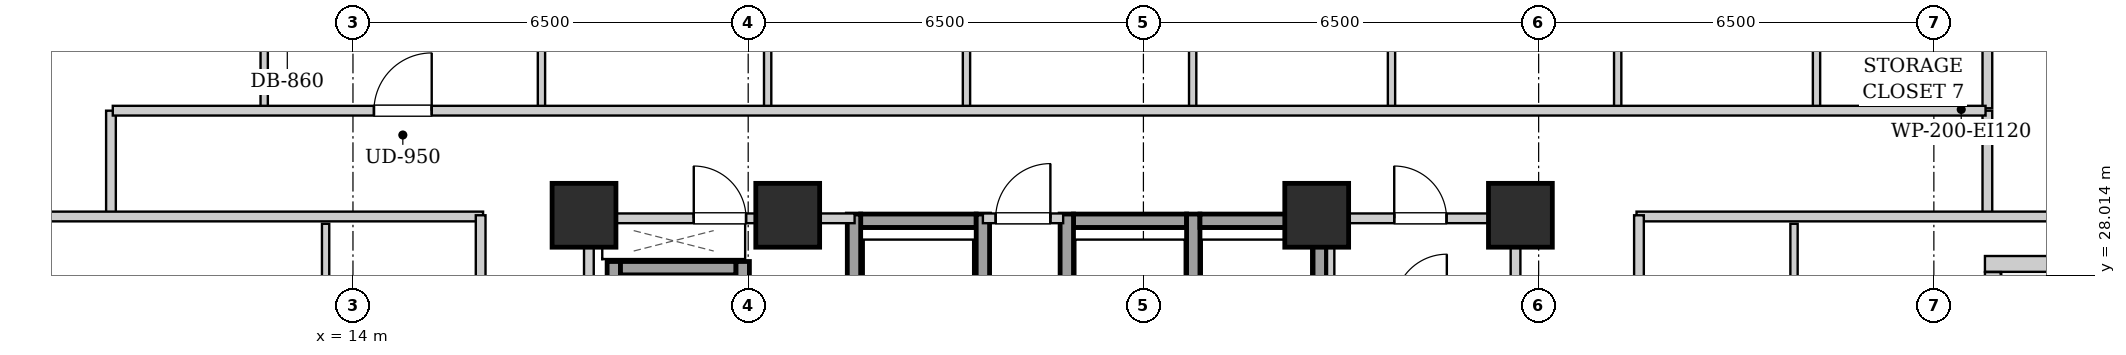
"""IFC4 building model, lengths in metres.
Left out: names, types, materials, properties, quantities, classifications, styles, units other than length and angle.
Written with IfcOpenShell. Run it as: python <this file> out.ifc"""

import sys

from ifc_helpers import new_model, si_unit, direction, frame, frame_2d, origin, origin_2d, place, context, subcontext, project, spatial, rectangle, extrude, element, fill, save


model = new_model("IFC4")
c1 = context("Model", 3, precision=1e-05, world=origin(), true_north=direction((0.0, 1.0)))
c2 = subcontext(c1, "Body", "Model", "MODEL_VIEW")
j1 = project(units=[si_unit("LENGTHUNIT", "METRE"), si_unit("PLANEANGLEUNIT", "RADIAN")], contexts=[c1])
p1 = place(None, origin())
s1 = spatial("IfcSite", under=j1, at=p1, CompositionType="ELEMENT")
p2 = place(p1, origin())
s2 = spatial("IfcBuilding", under=s1, at=p2, CompositionType="ELEMENT")
p3 = place(p2, frame((0.0, 0.0, 97.5)))
s3 = spatial("IfcBuildingStorey", under=s2, at=p3, CompositionType="ELEMENT", Elevation=97.5)
for number, where, z_axis, x_axis in (
    (1, (17.8, 29.0, 0.0), (0.0, 0.0, 1.0), (1.0, 0.0, 0.0)),
    (2, (21.15, 29.0, 0.0), (0.0, 0.0, 1.0), (1.0, 0.0, 0.0)),
    (3, (29.85, 29.0, 0.0), (0.0, 0.0, 1.0), (1.0, 0.0, 0.0)),
    (4, (33.2, 29.0, 0.0), (0.0, 0.0, 1.0), (1.0, 0.0, 0.0)),
):
    element("IfcColumn", number, at=place(p3, frame(where, z_axis=z_axis, x_axis=x_axis)), inside=s3, PredefinedType="COLUMN", context=c2, shape_type="SweptSolid", body=[
        extrude(rectangle(XDim=1.05, YDim=1.05, at=origin_2d()), origin(), (0.0, 0.0, 1.0), 3.2),
    ])
p4 = place(p3, frame((43.24, 28.2, 0.0), z_axis=(0.0, 0.0, 1.0), x_axis=(-1.0, 0.0, 0.0)))
e5 = element("IfcWall", 5, at=p4, inside=s3, PredefinedType="SOLIDWALL", context=c2, shape_type="SweptSolid", body=[
    extrude(rectangle(XDim=2.4, YDim=0.26, at=frame_2d((1.2, 0.0))), origin(), (0.0, 0.0, 1.0), 2.94),
])
p5 = place(p3, frame((40.97, 28.066, 0.0), z_axis=(0.0, 0.0, 1.0), x_axis=(0.0, -1.0, 0.0)))
e6 = element("IfcWall", 6, at=p5, inside=s3, PredefinedType="SOLIDWALL", context=c2, shape_type="SweptSolid", body=[
    extrude(rectangle(XDim=3.332, YDim=0.26, at=frame_2d((1.666, 0.0))), origin(), (0.0, 0.0, 1.0), 2.94),
])
p6 = place(p5, frame((1.116, 0.0, 0.0)))
e7 = element("IfcOpeningElement", 7, at=p6, cuts=e6, PredefinedType="OPENING", context=c2, shape_type="SweptSolid", body=[
    extrude(rectangle(XDim=1.1, YDim=2.0, at=frame_2d((0.55, 1.0))), frame((0.0, 0.14, 0.0), z_axis=(0.0, -1.0, 0.0), x_axis=(1.0, 0.0, 0.0)), (0.0, 0.0, 1.0), 0.28),
])
p7 = place(p5, frame((0.276, 0.0, 0.55)))
e8 = element("IfcOpeningElement", 8, at=p7, cuts=e6, PredefinedType="OPENING", context=c2, shape_type="SweptSolid", body=[
    extrude(rectangle(XDim=0.68, YDim=1.2, at=frame_2d((0.34, 0.6))), frame((0.0, 0.14, 0.0), z_axis=(0.0, -1.0, 0.0), x_axis=(1.0, 0.0, 0.0)), (0.0, 0.0, 1.0), 0.28),
])
p8 = place(p3, frame((22.35, 28.91, 0.0), z_axis=(0.0, 0.0, 1.0), x_axis=(1.0, 0.0, 0.0)))
e9 = element("IfcWall", 9, at=p8, inside=s3, PredefinedType="SHEAR", context=c2, shape_type="SweptSolid", body=[
    extrude(rectangle(XDim=1.9, YDim=0.22, at=frame_2d((0.95, 0.0))), origin(), (0.0, 0.0, 1.0), 2.94),
])
for number, where, z_axis, x_axis in (
    (10, (22.24, 26.58, 0.0), (0.0, 0.0, 1.0), (0.0, 1.0, 0.0)),
    (11, (24.36, 26.58, 0.0), (0.0, 0.0, 1.0), (0.0, 1.0, 0.0)),
):
    element("IfcWall", number, at=place(p3, frame(where, z_axis=z_axis, x_axis=x_axis)), inside=s3, PredefinedType="SHEAR", context=c2, shape_type="SweptSolid", body=[
        extrude(rectangle(XDim=2.44, YDim=0.22, at=frame_2d((1.22, 0.0))), origin(), (0.0, 0.0, 1.0), 2.94),
    ])
p9 = place(p3, frame((25.85, 28.91, 0.0), z_axis=(0.0, 0.0, 1.0), x_axis=(1.0, 0.0, 0.0)))
e12 = element("IfcWall", 12, at=p9, inside=s3, PredefinedType="SHEAR", context=c2, shape_type="SweptSolid", body=[
    extrude(rectangle(XDim=1.86, YDim=0.22, at=frame_2d((0.93, 0.0))), origin(), (0.0, 0.0, 1.0), 2.94),
])
for number, where, z_axis, x_axis in (
    (13, (25.74, 26.58, 0.0), (0.0, 0.0, 1.0), (0.0, 1.0, 0.0)),
    (14, (27.82, 26.58, 0.0), (0.0, 0.0, 1.0), (0.0, 1.0, 0.0)),
):
    element("IfcWall", number, at=place(p3, frame(where, z_axis=z_axis, x_axis=x_axis)), inside=s3, PredefinedType="SHEAR", context=c2, shape_type="SweptSolid", body=[
        extrude(rectangle(XDim=2.44, YDim=0.22, at=frame_2d((1.22, 0.0))), origin(), (0.0, 0.0, 1.0), 2.94),
    ])
p10 = place(p3, frame((27.93, 28.91, 0.0), z_axis=(0.0, 0.0, 1.0), x_axis=(1.0, 0.0, 0.0)))
e15 = element("IfcWall", 15, at=p10, inside=s3, PredefinedType="SHEAR", context=c2, shape_type="SweptSolid", body=[
    extrude(rectangle(XDim=1.86, YDim=0.22, at=frame_2d((0.93, 0.0))), origin(), (0.0, 0.0, 1.0), 2.94),
])
p11 = place(p3, frame((29.9, 26.58, 0.0), z_axis=(0.0, 0.0, 1.0), x_axis=(0.0, 1.0, 0.0)))
e16 = element("IfcWall", 16, at=p11, inside=s3, PredefinedType="SHEAR", context=c2, shape_type="SweptSolid", body=[
    extrude(rectangle(XDim=2.44, YDim=0.22, at=frame_2d((1.22, 0.0))), origin(), (0.0, 0.0, 1.0), 2.94),
])
p12 = place(p3, frame((18.29, 24.1, 0.0), z_axis=(0.0, 0.0, 1.0), x_axis=(0.0, 1.0, 0.0)))
e17 = element("IfcWall", 17, at=p12, inside=s3, PredefinedType="SHEAR", context=c2, shape_type="SweptSolid", body=[
    extrude(rectangle(XDim=4.14, YDim=0.22, at=frame_2d((2.07, 0.0))), origin(), (0.0, 0.0, 1.0), 2.94),
])
p13 = place(p3, frame((18.4, 28.13, 0.0), z_axis=(0.0, 0.0, 1.0), x_axis=(1.0, 0.0, 0.0)))
e18 = element("IfcWall", 18, at=p13, inside=s3, PredefinedType="SHEAR", context=c2, shape_type="SweptSolid", body=[
    extrude(rectangle(XDim=1.9, YDim=0.22, at=frame_2d((0.95, 0.0))), origin(), (0.0, 0.0, 1.0), 2.94),
])
p14 = place(p3, frame((20.41, 26.06, 0.0), z_axis=(0.0, 0.0, 1.0), x_axis=(0.0, 1.0, 0.0)))
e19 = element("IfcWall", 19, at=p14, inside=s3, PredefinedType="SHEAR", context=c2, shape_type="SweptSolid", body=[
    extrude(rectangle(XDim=2.18, YDim=0.22, at=frame_2d((1.09, 0.0))), origin(), (0.0, 0.0, 1.0), 2.94),
])
for number, where, z_axis, x_axis in (
    (20, (17.88, 24.12, 0.0), (0.0, 0.0, 1.0), (0.0, 1.0, 0.0)),
    (21, (33.12, 24.12, 0.0), (0.0, 0.0, 1.0), (0.0, 1.0, 0.0)),
):
    element("IfcWall", number, at=place(p3, frame(where, z_axis=z_axis, x_axis=x_axis)), inside=s3, PredefinedType="PARTITIONING", context=c2, shape_type="SweptSolid", body=[
        extrude(rectangle(XDim=4.76, YDim=0.16, at=frame_2d((2.38, 0.0))), origin(), (0.0, 0.0, 1.0), 2.275),
    ])
p15 = place(p3, frame((24.36, 28.95, 0.0), z_axis=(0.0, 0.0, 1.0), x_axis=(1.0, 0.0, 0.0)))
e22 = element("IfcWall", 22, at=p15, inside=s3, PredefinedType="PARTITIONING", context=c2, shape_type="SweptSolid", body=[
    extrude(rectangle(XDim=1.32, YDim=0.16, at=frame_2d((0.66, 0.0))), origin(), (0.0, 0.0, 1.0), 2.313),
])
p16 = place(p15, frame((0.21, 0.0, 0.0)))
e23 = element("IfcOpeningElement", 23, at=p16, cuts=e22, PredefinedType="OPENING", context=c2, shape_type="SweptSolid", body=[
    extrude(rectangle(XDim=0.9, YDim=2.05, at=frame_2d((0.45, 1.025))), frame((0.0, 0.09, 0.0), z_axis=(0.0, -1.0, 0.0), x_axis=(1.0, 0.0, 0.0)), (0.0, 0.0, 1.0), 0.18),
])
p17 = place(p3, frame((17.96, 28.95, 0.0), z_axis=(0.0, 0.0, 1.0), x_axis=(1.0, 0.0, 0.0)))
e24 = element("IfcWall", 24, at=p17, inside=s3, PredefinedType="PARTITIONING", context=c2, shape_type="SweptSolid", body=[
    extrude(rectangle(XDim=4.29, YDim=0.16, at=frame_2d((2.145, 0.0))), origin(), (0.0, 0.0, 1.0), 2.313),
])
p18 = place(p17, frame((1.645, 0.0, 0.0)))
e25 = element("IfcOpeningElement", 25, at=p18, cuts=e24, PredefinedType="OPENING", context=c2, shape_type="SweptSolid", body=[
    extrude(rectangle(XDim=0.86, YDim=2.05, at=frame_2d((0.43, 1.025))), frame((0.0, 0.09, 0.0), z_axis=(0.0, -1.0, 0.0), x_axis=(1.0, 0.0, 0.0)), (0.0, 0.0, 1.0), 0.18),
])
p19 = place(p3, frame((30.08, 26.18, 0.0), z_axis=(0.0, 0.0, 1.0), x_axis=(0.0, 1.0, 0.0)))
e26 = element("IfcWall", 26, at=p19, inside=s3, PredefinedType="PARTITIONING", context=c2, shape_type="SweptSolid", body=[
    extrude(rectangle(XDim=2.68, YDim=0.12, at=frame_2d((1.34, 0.0))), origin(), (0.0, 0.0, 1.0), 2.94),
])
p20 = place(p3, frame((30.08, 28.95, 0.0), z_axis=(0.0, 0.0, 1.0), x_axis=(1.0, 0.0, 0.0)))
e27 = element("IfcWall", 27, at=p20, inside=s3, PredefinedType="PARTITIONING", context=c2, shape_type="SweptSolid", body=[
    extrude(rectangle(XDim=2.96, YDim=0.16, at=frame_2d((1.48, 0.0))), origin(), (0.0, 0.0, 1.0), 2.94),
])
p21 = place(p20, frame((1.045, 0.0, 0.0)))
e28 = element("IfcOpeningElement", 28, at=p21, cuts=e27, PredefinedType="OPENING", context=c2, shape_type="SweptSolid", body=[
    extrude(rectangle(XDim=0.86, YDim=2.05, at=frame_2d((0.43, 1.025))), frame((0.0, 0.09, 0.0), z_axis=(0.0, -1.0, 0.0), x_axis=(1.0, 0.0, 0.0)), (0.0, 0.0, 1.0), 0.18),
])
for number, where, z_axis, x_axis in (
    (29, (10.02, 28.98, 0.0), (0.0, 0.0, 1.0), (0.0, 1.0, 0.0)),
    (30, (40.88, 28.98, 0.0), (0.0, 0.0, 1.0), (0.0, 1.0, 0.0)),
):
    element("IfcWall", number, at=place(p3, frame(where, z_axis=z_axis, x_axis=x_axis)), inside=s3, PredefinedType="PARTITIONING", context=c2, shape_type="SweptSolid", body=[
        extrude(rectangle(XDim=1.74, YDim=0.16, at=frame_2d((0.87, 0.0))), origin(), (0.0, 0.0, 1.0), 2.94),
    ])
p22 = place(p3, frame((7.78, 28.98, 0.0), z_axis=(0.0, 0.0, 1.0), x_axis=(1.0, 0.0, 0.0)))
e31 = element("IfcWall", 31, at=p22, inside=s3, PredefinedType="PARTITIONING", context=c2, shape_type="SweptSolid", body=[
    extrude(rectangle(XDim=8.36, YDim=0.16, at=frame_2d((4.18, 0.0))), origin(), (0.0, 0.0, 1.0), 2.313),
])
p23 = place(p3, frame((35.11, 28.98, 0.0), z_axis=(0.0, 0.0, 1.0), x_axis=(1.0, 0.0, 0.0)))
e32 = element("IfcWall", 32, at=p23, inside=s3, PredefinedType="PARTITIONING", context=c2, shape_type="SweptSolid", body=[
    extrude(rectangle(XDim=8.01, YDim=0.16, at=frame_2d((4.005, 0.0))), origin(), (0.0, 0.0, 1.0), 2.313),
])
p24 = place(p3, frame((40.88, 30.76, 0.0), z_axis=(0.0, 0.0, 1.0), x_axis=(0.0, 1.0, 0.0)))
e33 = element("IfcWall", 33, at=p24, inside=s3, PredefinedType="PARTITIONING", context=c2, shape_type="SweptSolid", body=[
    extrude(rectangle(XDim=2.91, YDim=0.16, at=frame_2d((1.455, 0.0))), origin(), (0.0, 0.0, 1.0), 2.94),
])
p25 = place(p3, frame((12.54, 30.76, 0.0), z_axis=(0.0, 0.0, 1.0), x_axis=(0.0, 1.0, 0.0)))
e34 = element("IfcWall", 34, at=p25, inside=s3, PredefinedType="PARTITIONING", context=c2, shape_type="SweptSolid", body=[
    extrude(rectangle(XDim=2.85, YDim=0.12, at=frame_2d((1.425, 0.0))), origin(), (0.0, 0.0, 1.0), 2.94),
])
p26 = place(p25, frame((0.995, 0.0, 0.0)))
e35 = element("IfcOpeningElement", 35, at=p26, cuts=e34, PredefinedType="OPENING", context=c2, shape_type="SweptSolid", body=[
    extrude(rectangle(XDim=0.86, YDim=2.05, at=frame_2d((0.43, 1.025))), frame((0.0, 0.07, 0.0), z_axis=(0.0, -1.0, 0.0), x_axis=(1.0, 0.0, 0.0)), (0.0, 0.0, 1.0), 0.14),
])
p27 = place(p3, frame((17.1, 30.76, 0.0), z_axis=(0.0, 0.0, 1.0), x_axis=(0.0, 1.0, 0.0)))
e36 = element("IfcWall", 36, at=p27, inside=s3, PredefinedType="PARTITIONING", context=c2, shape_type="SweptSolid", body=[
    extrude(rectangle(XDim=2.85, YDim=0.12, at=frame_2d((1.425, 0.0))), origin(), (0.0, 0.0, 1.0), 2.94),
])
p28 = place(p27, frame((0.975, 0.0, 0.0)))
e37 = element("IfcOpeningElement", 37, at=p28, cuts=e36, PredefinedType="OPENING", context=c2, shape_type="SweptSolid", body=[
    extrude(rectangle(XDim=0.9, YDim=2.05, at=frame_2d((0.45, 1.025))), frame((0.0, 0.07, 0.0), z_axis=(0.0, -1.0, 0.0), x_axis=(1.0, 0.0, 0.0)), (0.0, 0.0, 1.0), 0.14),
])
p29 = place(p3, frame((20.82, 30.76, 0.0), z_axis=(0.0, 0.0, 1.0), x_axis=(0.0, 1.0, 0.0)))
e38 = element("IfcWall", 38, at=p29, inside=s3, PredefinedType="PARTITIONING", context=c2, shape_type="SweptSolid", body=[
    extrude(rectangle(XDim=2.85, YDim=0.12, at=frame_2d((1.425, 0.0))), origin(), (0.0, 0.0, 1.0), 2.94),
])
p30 = place(p29, frame((0.975, 0.0, 0.0)))
e39 = element("IfcOpeningElement", 39, at=p30, cuts=e38, PredefinedType="OPENING", context=c2, shape_type="SweptSolid", body=[
    extrude(rectangle(XDim=0.9, YDim=2.05, at=frame_2d((0.45, 1.025))), frame((0.0, 0.07, 0.0), z_axis=(0.0, -1.0, 0.0), x_axis=(1.0, 0.0, 0.0)), (0.0, 0.0, 1.0), 0.14),
])
p31 = place(p3, frame((24.09, 30.76, 0.0), z_axis=(0.0, 0.0, 1.0), x_axis=(0.0, 1.0, 0.0)))
e40 = element("IfcWall", 40, at=p31, inside=s3, PredefinedType="PARTITIONING", context=c2, shape_type="SweptSolid", body=[
    extrude(rectangle(XDim=2.85, YDim=0.12, at=frame_2d((1.425, 0.0))), origin(), (0.0, 0.0, 1.0), 2.94),
])
p32 = place(p31, frame((0.975, 0.0, 0.0)))
e41 = element("IfcOpeningElement", 41, at=p32, cuts=e40, PredefinedType="OPENING", context=c2, shape_type="SweptSolid", body=[
    extrude(rectangle(XDim=0.9, YDim=2.05, at=frame_2d((0.45, 1.025))), frame((0.0, 0.07, 0.0), z_axis=(0.0, -1.0, 0.0), x_axis=(1.0, 0.0, 0.0)), (0.0, 0.0, 1.0), 0.14),
])
p33 = place(p3, frame((27.81, 30.76, 0.0), z_axis=(0.0, 0.0, 1.0), x_axis=(0.0, 1.0, 0.0)))
e42 = element("IfcWall", 42, at=p33, inside=s3, PredefinedType="PARTITIONING", context=c2, shape_type="SweptSolid", body=[
    extrude(rectangle(XDim=2.85, YDim=0.12, at=frame_2d((1.425, 0.0))), origin(), (0.0, 0.0, 1.0), 2.94),
])
p34 = place(p33, frame((0.975, 0.0, 0.0)))
e43 = element("IfcOpeningElement", 43, at=p34, cuts=e42, PredefinedType="OPENING", context=c2, shape_type="SweptSolid", body=[
    extrude(rectangle(XDim=0.9, YDim=2.05, at=frame_2d((0.45, 1.025))), frame((0.0, 0.07, 0.0), z_axis=(0.0, -1.0, 0.0), x_axis=(1.0, 0.0, 0.0)), (0.0, 0.0, 1.0), 0.14),
])
p35 = place(p3, frame((31.08, 30.76, 0.0), z_axis=(0.0, 0.0, 1.0), x_axis=(0.0, 1.0, 0.0)))
e44 = element("IfcWall", 44, at=p35, inside=s3, PredefinedType="PARTITIONING", context=c2, shape_type="SweptSolid", body=[
    extrude(rectangle(XDim=2.85, YDim=0.12, at=frame_2d((1.425, 0.0))), origin(), (0.0, 0.0, 1.0), 2.94),
])
p36 = place(p35, frame((0.975, 0.0, 0.0)))
e45 = element("IfcOpeningElement", 45, at=p36, cuts=e44, PredefinedType="OPENING", context=c2, shape_type="SweptSolid", body=[
    extrude(rectangle(XDim=0.9, YDim=2.05, at=frame_2d((0.45, 1.025))), frame((0.0, 0.07, 0.0), z_axis=(0.0, -1.0, 0.0), x_axis=(1.0, 0.0, 0.0)), (0.0, 0.0, 1.0), 0.14),
])
p37 = place(p3, frame((34.8, 30.76, 0.0), z_axis=(0.0, 0.0, 1.0), x_axis=(0.0, 1.0, 0.0)))
e46 = element("IfcWall", 46, at=p37, inside=s3, PredefinedType="PARTITIONING", context=c2, shape_type="SweptSolid", body=[
    extrude(rectangle(XDim=2.85, YDim=0.12, at=frame_2d((1.425, 0.0))), origin(), (0.0, 0.0, 1.0), 2.94),
])
p38 = place(p37, frame((0.975, 0.0, 0.0)))
e47 = element("IfcOpeningElement", 47, at=p38, cuts=e46, PredefinedType="OPENING", context=c2, shape_type="SweptSolid", body=[
    extrude(rectangle(XDim=0.9, YDim=2.05, at=frame_2d((0.45, 1.025))), frame((0.0, 0.07, 0.0), z_axis=(0.0, -1.0, 0.0), x_axis=(1.0, 0.0, 0.0)), (0.0, 0.0, 1.0), 0.14),
])
p39 = place(p3, frame((38.07, 30.76, 0.0), z_axis=(0.0, 0.0, 1.0), x_axis=(0.0, 1.0, 0.0)))
e48 = element("IfcWall", 48, at=p39, inside=s3, PredefinedType="PARTITIONING", context=c2, shape_type="SweptSolid", body=[
    extrude(rectangle(XDim=2.85, YDim=0.12, at=frame_2d((1.425, 0.0))), origin(), (0.0, 0.0, 1.0), 2.94),
])
p40 = place(p39, frame((0.975, 0.0, 0.0)))
e49 = element("IfcOpeningElement", 49, at=p40, cuts=e48, PredefinedType="OPENING", context=c2, shape_type="SweptSolid", body=[
    extrude(rectangle(XDim=0.9, YDim=2.05, at=frame_2d((0.45, 1.025))), frame((0.0, 0.07, 0.0), z_axis=(0.0, -1.0, 0.0), x_axis=(1.0, 0.0, 0.0)), (0.0, 0.0, 1.0), 0.14),
])
p41 = place(p3, frame((13.55, 25.052, 0.0), z_axis=(0.0, 0.0, 1.0), x_axis=(0.0, 1.0, 0.0)))
e50 = element("IfcWall", 50, at=p41, inside=s3, PredefinedType="PARTITIONING", context=c2, shape_type="SweptSolid", body=[
    extrude(rectangle(XDim=3.808, YDim=0.12, at=frame_2d((1.904, 0.0))), origin(), (0.0, 0.0, 1.0), 2.94),
])
p42 = place(p41, frame((1.454, 0.0, 0.0)))
e51 = element("IfcOpeningElement", 51, at=p42, cuts=e50, PredefinedType="OPENING", context=c2, shape_type="SweptSolid", body=[
    extrude(rectangle(XDim=0.9, YDim=2.05, at=frame_2d((0.45, 1.025))), frame((0.0, 0.07, 0.0), z_axis=(0.0, -1.0, 0.0), x_axis=(1.0, 0.0, 0.0)), (0.0, 0.0, 1.0), 0.14),
])
p43 = place(p3, frame((37.7, 24.552, 0.0), z_axis=(0.0, 0.0, 1.0), x_axis=(0.0, 1.0, 0.0)))
e52 = element("IfcWall", 52, at=p43, inside=s3, PredefinedType="PARTITIONING", context=c2, shape_type="SweptSolid", body=[
    extrude(rectangle(XDim=4.308, YDim=0.12, at=frame_2d((2.154, 0.0))), origin(), (0.0, 0.0, 1.0), 2.94),
])
p44 = place(p43, frame((1.704, 0.0, 0.0)))
e53 = element("IfcOpeningElement", 53, at=p44, cuts=e52, PredefinedType="OPENING", context=c2, shape_type="SweptSolid", body=[
    extrude(rectangle(XDim=0.9, YDim=2.05, at=frame_2d((0.45, 1.025))), frame((0.0, 0.07, 0.0), z_axis=(0.0, -1.0, 0.0), x_axis=(1.0, 0.0, 0.0)), (0.0, 0.0, 1.0), 0.14),
])
p45 = place(p3, frame((10.05, 30.72, 0.0), z_axis=(0.0, 0.0, 1.0), x_axis=(1.0, 0.0, 0.0)))
e54 = element("IfcWall", 54, at=p45, inside=s3, PredefinedType="PARTITIONING", context=c2, shape_type="SweptSolid", body=[
    extrude(rectangle(XDim=30.8, YDim=0.16, at=frame_2d((15.4, 0.0))), origin(), (0.0, 0.0, 1.0), 2.94),
])
p46 = place(p45, frame((4.295, 0.0, 0.0)))
e55 = element("IfcOpeningElement", 55, at=p46, cuts=e54, PredefinedType="OPENING", context=c2, shape_type="SweptSolid", body=[
    extrude(rectangle(XDim=0.95, YDim=2.1, at=frame_2d((0.475, 1.05))), frame((0.0, 0.09, 0.0), z_axis=(0.0, -1.0, 0.0), x_axis=(1.0, 0.0, 0.0)), (0.0, 0.0, 1.0), 0.18),
])
p47 = place(p3, frame((16.1, 15.07, 0.0), z_axis=(0.0, 0.0, 1.0), x_axis=(0.0, 1.0, 0.0)))
e56 = element("IfcWall", 56, at=p47, inside=s3, PredefinedType="PARTITIONING", context=c2, shape_type="SweptSolid", body=[
    extrude(rectangle(XDim=13.93, YDim=0.16, at=frame_2d((6.965, 0.0))), origin(), (0.0, 0.0, 1.0), 2.94),
])
p48 = place(p47, frame((4.661, 0.0, 0.0)))
e57 = element("IfcOpeningElement", 57, at=p48, cuts=e56, PredefinedType="OPENING", context=c2, shape_type="SweptSolid", body=[
    extrude(rectangle(XDim=0.95, YDim=2.1, at=frame_2d((0.475, 1.05))), frame((0.0, 0.09, 0.0), z_axis=(0.0, -1.0, 0.0), x_axis=(1.0, 0.0, 0.0)), (0.0, 0.0, 1.0), 0.18),
])
p49 = place(p47, frame((11.411, 0.0, 0.0)))
e58 = element("IfcOpeningElement", 58, at=p49, cuts=e56, PredefinedType="OPENING", context=c2, shape_type="SweptSolid", body=[
    extrude(rectangle(XDim=0.95, YDim=2.1, at=frame_2d((0.475, 1.05))), frame((0.0, 0.09, 0.0), z_axis=(0.0, -1.0, 0.0), x_axis=(1.0, 0.0, 0.0)), (0.0, 0.0, 1.0), 0.18),
])
p50 = place(p3, frame((35.15, 15.07, 0.0), z_axis=(0.0, 0.0, 1.0), x_axis=(0.0, 1.0, 0.0)))
e59 = element("IfcWall", 59, at=p50, inside=s3, PredefinedType="PARTITIONING", context=c2, shape_type="SweptSolid", body=[
    extrude(rectangle(XDim=13.93, YDim=0.16, at=frame_2d((6.965, 0.0))), origin(), (0.0, 0.0, 1.0), 2.94),
])
p51 = place(p50, frame((4.385, 0.0, 0.0)))
e60 = element("IfcOpeningElement", 60, at=p51, cuts=e59, PredefinedType="OPENING", context=c2, shape_type="SweptSolid", body=[
    extrude(rectangle(XDim=0.95, YDim=2.1, at=frame_2d((0.475, 1.05))), frame((0.0, 0.09, 0.0), z_axis=(0.0, -1.0, 0.0), x_axis=(1.0, 0.0, 0.0)), (0.0, 0.0, 1.0), 0.18),
])
p52 = place(p16, origin())
e61 = element("IfcDoor", 61, at=p52, inside=s3, OperationType="SINGLE_SWING_RIGHT", PredefinedType="DOOR", context=c2, shape_type="SweptSolid", body=[
    extrude(rectangle(XDim=0.9, YDim=2.05, at=frame_2d((0.45, 1.025))), frame((0.0, 0.025, 0.0), z_axis=(0.0, -1.0, 0.0), x_axis=(1.0, 0.0, 0.0)), (0.0, 0.0, 1.0), 0.05),
])
fill(e23, e61)
p53 = place(p18, origin())
e62 = element("IfcDoor", 62, at=p53, inside=s3, OperationType="SINGLE_SWING_LEFT", PredefinedType="DOOR", context=c2, shape_type="SweptSolid", body=[
    extrude(rectangle(XDim=0.86, YDim=2.05, at=frame_2d((0.43, 1.025))), frame((0.0, 0.025, 0.0), z_axis=(0.0, -1.0, 0.0), x_axis=(1.0, 0.0, 0.0)), (0.0, 0.0, 1.0), 0.05),
])
fill(e25, e62)
p54 = place(p21, origin())
e63 = element("IfcDoor", 63, at=p54, inside=s3, OperationType="SINGLE_SWING_LEFT", PredefinedType="DOOR", context=c2, shape_type="SweptSolid", body=[
    extrude(rectangle(XDim=0.86, YDim=2.05, at=frame_2d((0.43, 1.025))), frame((0.0, 0.025, 0.0), z_axis=(0.0, -1.0, 0.0), x_axis=(1.0, 0.0, 0.0)), (0.0, 0.0, 1.0), 0.05),
])
fill(e28, e63)
p55 = place(p46, origin())
e64 = element("IfcDoor", 64, at=p55, inside=s3, OperationType="SINGLE_SWING_RIGHT", PredefinedType="DOOR", context=c2, shape_type="SweptSolid", body=[
    extrude(rectangle(XDim=0.95, YDim=2.1, at=frame_2d((0.475, 1.05))), frame((0.0, 0.025, 0.0), z_axis=(0.0, -1.0, 0.0), x_axis=(1.0, 0.0, 0.0)), (0.0, 0.0, 1.0), 0.05),
])
fill(e55, e64)
save(model, sys.argv[1])
